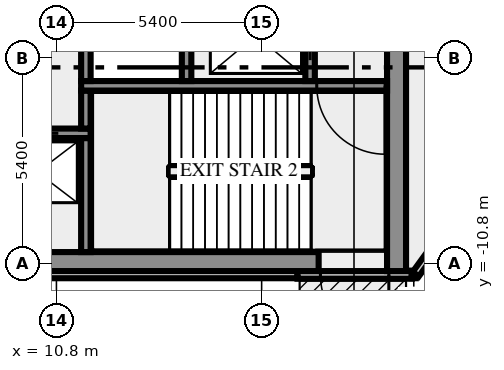
"""IFC4 building model, lengths in metres.
Left out: names, types, materials, properties, quantities, classifications, styles, units other than length and angle.
Written with IfcOpenShell. Run it as: python <this file> out.ifc"""

import sys

from ifc_helpers import new_model, si_unit, direction, frame, frame_2d, origin, place, context, subcontext, project, spatial, rectangle, extrude, element, fill, save


model = new_model("IFC4")
c1 = context("Model", 3, precision=1e-05, world=origin(), true_north=direction((0.0, 1.0)))
c2 = subcontext(c1, "Body", "Model", "MODEL_VIEW")
j1 = project(units=[si_unit("LENGTHUNIT", "METRE"), si_unit("PLANEANGLEUNIT", "RADIAN")], contexts=[c1])
p1 = place(None, origin())
s1 = spatial("IfcSite", under=j1, at=p1, CompositionType="ELEMENT")
p2 = place(p1, origin())
s2 = spatial("IfcBuilding", under=s1, at=p2, CompositionType="ELEMENT")
p3 = place(p2, origin())
s3 = spatial("IfcBuildingStorey", under=s2, at=p3, CompositionType="ELEMENT", Elevation=0.0)
p4 = place(p3, frame((-17.143, -11.088, 0.0), z_axis=(0.0, 0.0, 1.0), x_axis=(1.0, 0.0, 0.0)))
e1 = element("IfcWall", 1, at=p4, inside=s3, PredefinedType="SOLIDWALL", context=c2, shape_type="SweptSolid", body=[
    extrude(rectangle(XDim=34.287, YDim=0.2, at=frame_2d((17.143, 0.0))), origin(), (0.0, 0.0, 1.0), 5.6),
])
p5 = place(p3, frame((20.151, -11.1, 0.0), z_axis=(0.0, 0.0, 1.0), x_axis=(-1.0, 0.0, 0.0)))
e2 = element("IfcWall", 2, at=p5, inside=s3, PredefinedType="SOLIDWALL", context=c2, shape_type="SweptSolid", body=[
    extrude(rectangle(XDim=3.008, YDim=0.2, at=frame_2d((1.504, 0.0))), origin(), (0.0, 0.0, 1.0), 5.6),
])
p6 = place(p5, frame((0.604, 0.0, 0.0)))
e3 = element("IfcOpeningElement", 3, at=p6, cuts=e2, PredefinedType="OPENING", context=c2, shape_type="SweptSolid", body=[
    extrude(rectangle(XDim=1.8, YDim=2.2, at=frame_2d((0.9, 1.1))), frame((0.0, 0.11, 0.0), z_axis=(0.0, -1.0, 0.0), x_axis=(1.0, 0.0, 0.0)), (0.0, 0.0, 1.0), 0.22),
])
p7 = place(p3, frame((20.151, -11.088, 0.0), z_axis=(0.0, 0.0, 1.0), x_axis=(1.0, 0.0, 0.0)))
e4 = element("IfcWall", 4, at=p7, inside=s3, PredefinedType="SOLIDWALL", context=c2, shape_type="SweptSolid", body=[
    extrude(rectangle(XDim=0.105, YDim=0.2, at=frame_2d((0.053, 0.0))), origin(), (0.0, 0.0, 1.0), 5.6),
])
p8 = place(p3, frame((20.253, -11.083, 0.0), z_axis=(0.0, 0.0, 1.0), x_axis=(0.587766567315, 0.809030569476, 0.0)))
e5 = element("IfcWall", 5, at=p8, inside=s3, PredefinedType="SOLIDWALL", context=c2, shape_type="SweptSolid", body=[
    extrude(rectangle(XDim=2.688, YDim=0.2, at=frame_2d((1.344, 0.0))), origin(), (0.0, 0.0, 1.0), 5.6),
])
p9 = place(p3, frame((-17.7, -10.75, 0.0), z_axis=(0.0, 0.0, 1.0), x_axis=(1.0, 0.0, 0.0)))
e6 = element("IfcWall", 6, at=p9, inside=s3, PredefinedType="SHEAR", context=c2, shape_type="SweptSolid", body=[
    extrude(rectangle(XDim=35.4, YDim=0.5, at=frame_2d((17.7, 0.0))), origin(), (0.0, 0.0, 1.0), 5.6),
])
p10 = place(p3, frame((19.75, -11.0, 0.0), z_axis=(0.0, 0.0, 1.0), x_axis=(0.0, 1.0, 0.0)))
e7 = element("IfcWall", 7, at=p10, inside=s3, PredefinedType="SHEAR", context=c2, shape_type="SweptSolid", body=[
    extrude(rectangle(XDim=9.3, YDim=0.5, at=frame_2d((4.65, 0.0))), origin(), (0.0, 0.0, 1.0), 5.6),
])
p11 = place(p3, frame((11.575, -10.5, 0.0), z_axis=(0.0, 0.0, 1.0), x_axis=(0.0, 1.0, 0.0)))
e8 = element("IfcWall", 8, at=p11, inside=s3, PredefinedType="SHEAR", context=c2, shape_type="SweptSolid", body=[
    extrude(rectangle(XDim=3.0, YDim=0.25, at=frame_2d((1.5, 0.0))), origin(), (0.0, 0.0, 1.0), 5.6),
])
p12 = place(p3, frame((11.7, -7.375, 0.0), z_axis=(0.0, 0.0, 1.0), x_axis=(-1.0, 0.0, 0.0)))
e9 = element("IfcWall", 9, at=p12, inside=s3, PredefinedType="SHEAR", context=c2, shape_type="SweptSolid", body=[
    extrude(rectangle(XDim=23.4, YDim=0.25, at=frame_2d((11.7, 0.0))), origin(), (0.0, 0.0, 1.0), 5.6),
])
p13 = place(p12, frame((21.45, 0.0, 0.0)))
e10 = element("IfcOpeningElement", 10, at=p13, cuts=e9, PredefinedType="OPENING", context=c2, shape_type="SweptSolid", body=[
    extrude(rectangle(XDim=1.1, YDim=2.1, at=frame_2d((0.55, 1.05))), frame((0.0, 0.135, 0.0), z_axis=(0.0, -1.0, 0.0), x_axis=(1.0, 0.0, 0.0)), (0.0, 0.0, 1.0), 0.27),
])
p14 = place(p12, frame((18.95, 0.0, 0.0)))
e11 = element("IfcOpeningElement", 11, at=p14, cuts=e9, PredefinedType="OPENING", context=c2, shape_type="SweptSolid", body=[
    extrude(rectangle(XDim=1.1, YDim=2.1, at=frame_2d((0.55, 1.05))), frame((0.0, 0.135, 0.0), z_axis=(0.0, -1.0, 0.0), x_axis=(1.0, 0.0, 0.0)), (0.0, 0.0, 1.0), 0.27),
])
p15 = place(p12, frame((16.45, 0.0, 0.0)))
e12 = element("IfcOpeningElement", 12, at=p15, cuts=e9, PredefinedType="OPENING", context=c2, shape_type="SweptSolid", body=[
    extrude(rectangle(XDim=1.1, YDim=2.1, at=frame_2d((0.55, 1.05))), frame((0.0, 0.135, 0.0), z_axis=(0.0, -1.0, 0.0), x_axis=(1.0, 0.0, 0.0)), (0.0, 0.0, 1.0), 0.27),
])
p16 = place(p12, frame((14.25, 0.0, 0.0)))
e13 = element("IfcOpeningElement", 13, at=p16, cuts=e9, PredefinedType="OPENING", context=c2, shape_type="SweptSolid", body=[
    extrude(rectangle(XDim=0.9, YDim=2.1, at=frame_2d((0.45, 1.05))), frame((0.0, 0.135, 0.0), z_axis=(0.0, -1.0, 0.0), x_axis=(1.0, 0.0, 0.0)), (0.0, 0.0, 1.0), 0.27),
])
p17 = place(p12, frame((12.125, 0.0, 0.0)))
e14 = element("IfcOpeningElement", 14, at=p17, cuts=e9, PredefinedType="OPENING", context=c2, shape_type="SweptSolid", body=[
    extrude(rectangle(XDim=0.9, YDim=2.1, at=frame_2d((0.45, 1.05))), frame((0.0, 0.135, 0.0), z_axis=(0.0, -1.0, 0.0), x_axis=(1.0, 0.0, 0.0)), (0.0, 0.0, 1.0), 0.27),
])
p18 = place(p12, frame((10.45, 0.0, 0.0)))
e15 = element("IfcOpeningElement", 15, at=p18, cuts=e9, PredefinedType="OPENING", context=c2, shape_type="SweptSolid", body=[
    extrude(rectangle(XDim=0.75, YDim=2.1, at=frame_2d((0.375, 1.05))), frame((0.0, 0.135, 0.0), z_axis=(0.0, -1.0, 0.0), x_axis=(1.0, 0.0, 0.0)), (0.0, 0.0, 1.0), 0.27),
])
p19 = place(p12, frame((8.35, 0.0, 0.0)))
e16 = element("IfcOpeningElement", 16, at=p19, cuts=e9, PredefinedType="OPENING", context=c2, shape_type="SweptSolid", body=[
    extrude(rectangle(XDim=1.1, YDim=2.1, at=frame_2d((0.55, 1.05))), frame((0.0, 0.135, 0.0), z_axis=(0.0, -1.0, 0.0), x_axis=(1.0, 0.0, 0.0)), (0.0, 0.0, 1.0), 0.27),
])
p20 = place(p12, frame((5.85, 0.0, 0.0)))
e17 = element("IfcOpeningElement", 17, at=p20, cuts=e9, PredefinedType="OPENING", context=c2, shape_type="SweptSolid", body=[
    extrude(rectangle(XDim=1.1, YDim=2.1, at=frame_2d((0.55, 1.05))), frame((0.0, 0.135, 0.0), z_axis=(0.0, -1.0, 0.0), x_axis=(1.0, 0.0, 0.0)), (0.0, 0.0, 1.0), 0.27),
])
p21 = place(p12, frame((3.35, 0.0, 0.0)))
e18 = element("IfcOpeningElement", 18, at=p21, cuts=e9, PredefinedType="OPENING", context=c2, shape_type="SweptSolid", body=[
    extrude(rectangle(XDim=1.1, YDim=2.1, at=frame_2d((0.55, 1.05))), frame((0.0, 0.135, 0.0), z_axis=(0.0, -1.0, 0.0), x_axis=(1.0, 0.0, 0.0)), (0.0, 0.0, 1.0), 0.27),
])
p22 = place(p12, frame((0.85, 0.0, 0.0)))
e19 = element("IfcOpeningElement", 19, at=p22, cuts=e9, PredefinedType="OPENING", context=c2, shape_type="SweptSolid", body=[
    extrude(rectangle(XDim=1.1, YDim=2.1, at=frame_2d((0.55, 1.05))), frame((0.0, 0.135, 0.0), z_axis=(0.0, -1.0, 0.0), x_axis=(1.0, 0.0, 0.0)), (0.0, 0.0, 1.0), 0.27),
])
p23 = place(p3, frame((11.575, -7.25, 0.0), z_axis=(0.0, 0.0, 1.0), x_axis=(0.0, 1.0, 0.0)))
e20 = element("IfcWall", 20, at=p23, inside=s3, PredefinedType="SHEAR", context=c2, shape_type="SweptSolid", body=[
    extrude(rectangle(XDim=1.0, YDim=0.25, at=frame_2d((0.5, 0.0))), origin(), (0.0, 0.0, 1.0), 5.6),
])
p24 = place(p3, frame((19.5, -6.125, 0.0), z_axis=(0.0, 0.0, 1.0), x_axis=(-1.0, 0.0, 0.0)))
e21 = element("IfcWall", 21, at=p24, inside=s3, PredefinedType="SHEAR", context=c2, shape_type="SweptSolid", body=[
    extrude(rectangle(XDim=8.05, YDim=0.25, at=frame_2d((4.025, 0.0))), origin(), (0.0, 0.0, 1.0), 5.6),
])
p25 = place(p24, frame((0.05, 0.0, 0.0)))
e22 = element("IfcOpeningElement", 22, at=p25, cuts=e21, PredefinedType="OPENING", context=c2, shape_type="SweptSolid", body=[
    extrude(rectangle(XDim=1.8, YDim=2.1, at=frame_2d((0.9, 1.05))), frame((0.0, 0.135, 0.0), z_axis=(0.0, -1.0, 0.0), x_axis=(1.0, 0.0, 0.0)), (0.0, 0.0, 1.0), 0.27),
])
p26 = place(p3, frame((11.575, -6.0, 0.0), z_axis=(0.0, 0.0, 1.0), x_axis=(0.0, 1.0, 0.0)))
e23 = element("IfcWall", 23, at=p26, inside=s3, PredefinedType="SHEAR", context=c2, shape_type="SweptSolid", body=[
    extrude(rectangle(XDim=1.75, YDim=0.25, at=frame_2d((0.875, 0.0))), origin(), (0.0, 0.0, 1.0), 5.6),
])
p27 = place(p3, frame((14.225, -6.0, 0.0), z_axis=(0.0, 0.0, 1.0), x_axis=(0.0, 1.0, 0.0)))
e24 = element("IfcWall", 24, at=p27, inside=s3, PredefinedType="SHEAR", context=c2, shape_type="SweptSolid", body=[
    extrude(rectangle(XDim=4.3, YDim=0.25, at=frame_2d((2.15, 0.0))), origin(), (0.0, 0.0, 1.0), 5.6),
])
p28 = place(p3, frame((17.475, -6.0, 0.0), z_axis=(0.0, 0.0, 1.0), x_axis=(0.0, 1.0, 0.0)))
e25 = element("IfcWall", 25, at=p28, inside=s3, PredefinedType="SHEAR", context=c2, shape_type="SweptSolid", body=[
    extrude(rectangle(XDim=4.3, YDim=0.25, at=frame_2d((2.15, 0.0))), origin(), (0.0, 0.0, 1.0), 5.6),
])
p29 = place(p28, frame((0.55, 0.0, 0.0)))
e26 = element("IfcOpeningElement", 26, at=p29, cuts=e25, PredefinedType="OPENING", context=c2, shape_type="SweptSolid", body=[
    extrude(rectangle(XDim=1.3, YDim=2.1, at=frame_2d((0.65, 1.05))), frame((0.0, 0.135, 0.0), z_axis=(0.0, -1.0, 0.0), x_axis=(1.0, 0.0, 0.0)), (0.0, 0.0, 1.0), 0.27),
])
p30 = place(p6, origin())
e27 = element("IfcDoor", 27, at=p30, inside=s3, OperationType="DOUBLE_DOOR_SINGLE_SWING", PredefinedType="DOOR", context=c2, shape_type="SweptSolid", body=[
    extrude(rectangle(XDim=1.8, YDim=2.2, at=frame_2d((0.9, 1.1))), frame((0.0, 0.025, 0.0), z_axis=(0.0, -1.0, 0.0), x_axis=(1.0, 0.0, 0.0)), (0.0, 0.0, 1.0), 0.05),
])
fill(e3, e27)
p31 = place(p22, origin())
e28 = element("IfcDoor", 28, at=p31, inside=s3, OperationType="DOUBLE_DOOR_SLIDING", PredefinedType="DOOR", context=c2, shape_type="SweptSolid", body=[
    extrude(rectangle(XDim=1.1, YDim=2.1, at=frame_2d((0.55, 1.05))), frame((0.0, 0.025, 0.0), z_axis=(0.0, -1.0, 0.0), x_axis=(1.0, 0.0, 0.0)), (0.0, 0.0, 1.0), 0.05),
])
fill(e19, e28)
p32 = place(p25, origin())
e29 = element("IfcDoor", 29, at=p32, inside=s3, OperationType="DOUBLE_DOOR_SINGLE_SWING", PredefinedType="DOOR", context=c2, shape_type="SweptSolid", body=[
    extrude(rectangle(XDim=1.8, YDim=2.1, at=frame_2d((0.9, 1.05))), frame((0.0, 0.025, 0.0), z_axis=(0.0, -1.0, 0.0), x_axis=(1.0, 0.0, 0.0)), (0.0, 0.0, 1.0), 0.05),
])
fill(e22, e29)
p33 = place(p29, origin())
e30 = element("IfcDoor", 30, at=p33, inside=s3, OperationType="DOUBLE_DOOR_SLIDING", PredefinedType="DOOR", context=c2, shape_type="SweptSolid", body=[
    extrude(rectangle(XDim=1.3, YDim=2.1, at=frame_2d((0.65, 1.05))), frame((0.0, 0.025, 0.0), z_axis=(0.0, -1.0, 0.0), x_axis=(1.0, 0.0, 0.0)), (0.0, 0.0, 1.0), 0.05),
])
fill(e26, e30)
save(model, sys.argv[1])
